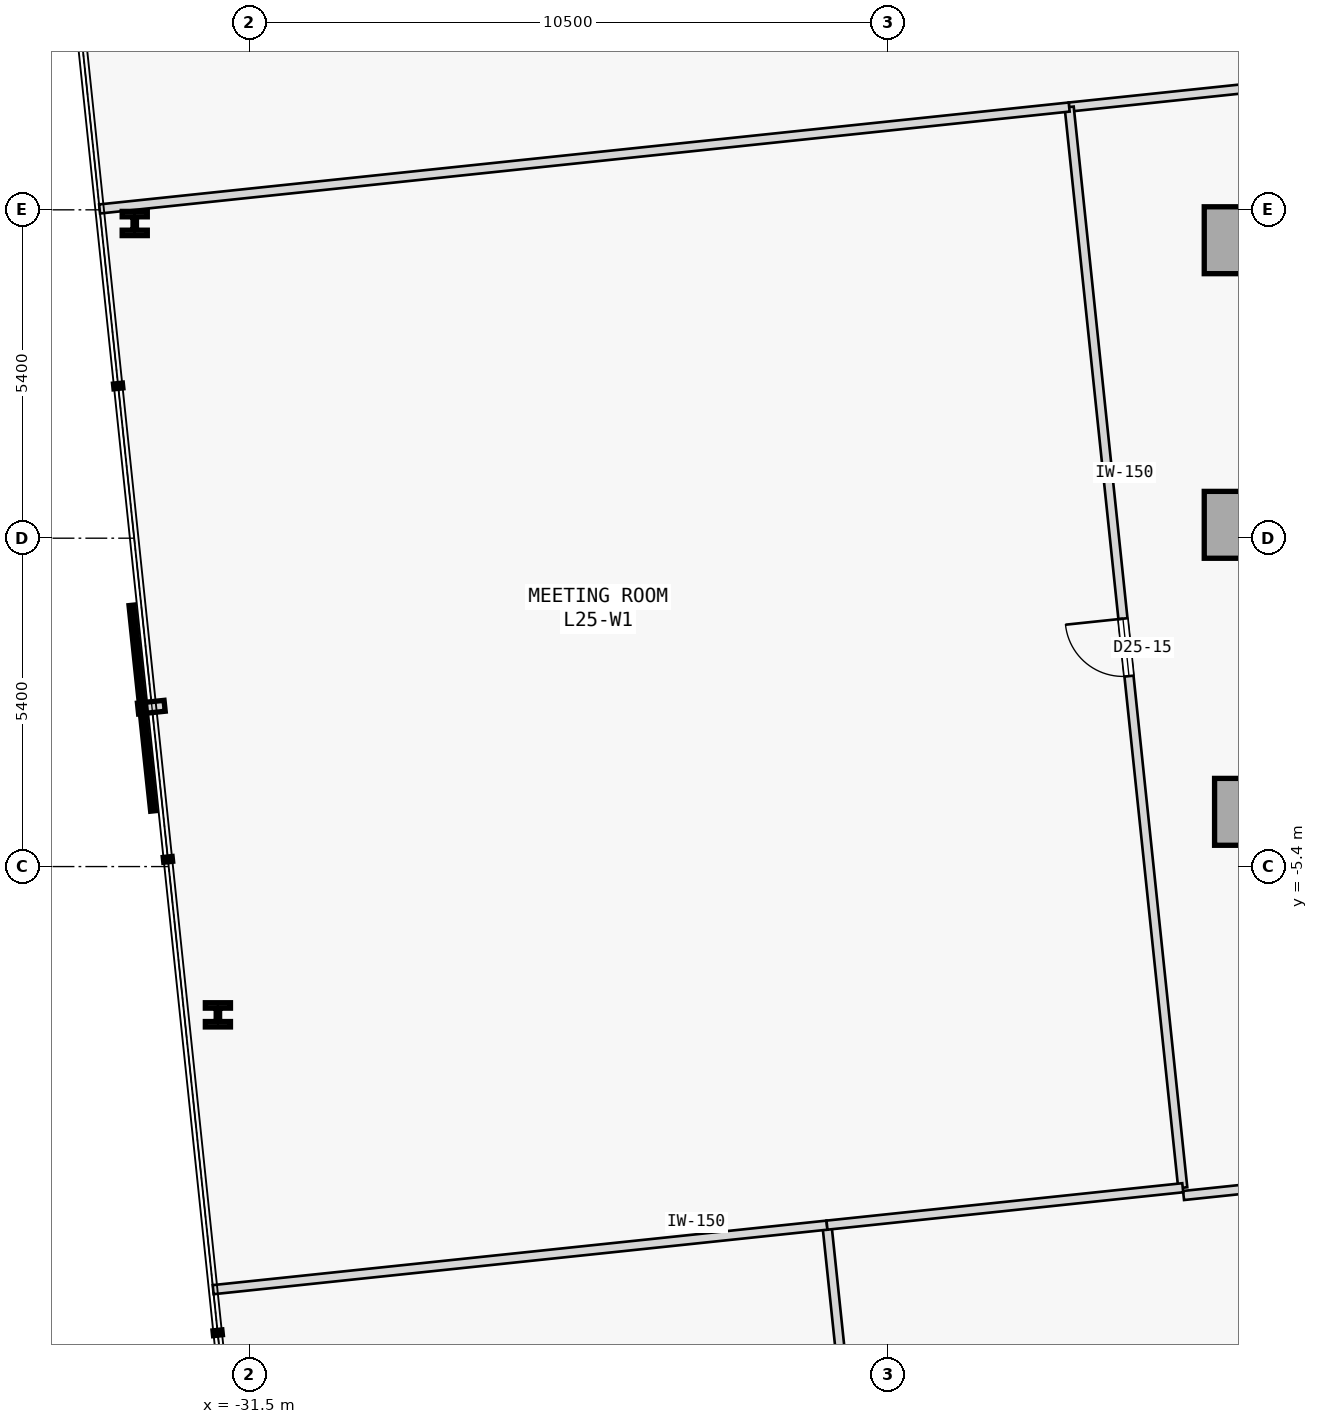
"""IFC4 building model, lengths in metres.
Left out: names, types, materials, properties, quantities, classifications, styles, units other than length and angle.
Written with IfcOpenShell. Run it as: python <this file> out.ifc"""

import sys

from ifc_helpers import new_model, si_unit, direction, frame, frame_2d, origin, origin_2d, place, context, subcontext, project, spatial, rectangle, i_section, extrude, element, fill, save


model = new_model("IFC4")
c1 = context("Model", 3, precision=1e-05, world=origin(), true_north=direction((0.0, 1.0)))
c2 = subcontext(c1, "Body", "Model", "MODEL_VIEW")
j1 = project(units=[si_unit("LENGTHUNIT", "METRE"), si_unit("PLANEANGLEUNIT", "RADIAN")], contexts=[c1])
p1 = place(None, origin())
s1 = spatial("IfcSite", under=j1, at=p1, CompositionType="ELEMENT")
p2 = place(p1, origin())
s2 = spatial("IfcBuilding", under=s1, at=p2, CompositionType="ELEMENT")
p3 = place(p2, frame((0.0, 0.0, 102.2)))
s3 = spatial("IfcBuildingStorey", under=s2, at=p3, CompositionType="ELEMENT", Elevation=102.2)
for number, where, z_axis, x_axis in (
    (1, (-15.25, 4.9, 0.0), (0.0, 0.0, 1.0), (1.0, 0.0, 0.0)),
    (2, (-15.25, 0.22, 0.0), (0.0, 0.0, 1.0), (1.0, 0.0, 0.0)),
    (3, (-15.08, -4.5, 0.0), (0.0, 0.0, 1.0), (1.0, 0.0, 0.0)),
):
    element("IfcColumn", number, at=place(p3, frame(where, z_axis=z_axis, x_axis=x_axis)), inside=s3, PredefinedType="COLUMN", context=c2, shape_type="SweptSolid", body=[
        extrude(rectangle(XDim=1.1, YDim=1.1, at=origin_2d()), origin(), (0.0, 0.0, 1.0), 3.7),
    ])
for number, where, z_axis, x_axis in (
    (4, (-33.388, 5.175, 0.0), (0.0, 0.0, 1.0), (1.0, 0.0, 0.0)),
    (5, (-32.021, -7.838, 0.0), (0.0, 0.0, 1.0), (1.0, 0.0, 0.0)),
):
    element("IfcColumn", number, at=place(p3, frame(where, z_axis=z_axis, x_axis=x_axis)), inside=s3, PredefinedType="COLUMN", context=c2, shape_type="SweptSolid", body=[
        extrude(i_section(OverallWidth=0.413, OverallDepth=0.398, WebThickness=0.056, FlangeThickness=0.089, FilletRadius=0.015, at=origin_2d()), origin(), (0.0, 0.0, 1.0), 3.7),
    ])
p4 = place(p3, frame((-18.021, 7.09, 0.0), z_axis=(0.0, 0.0, 1.0), x_axis=(0.994522981742, 0.104518126592, 0.0)))
e6 = element("IfcWall", 6, at=p4, inside=s3, PredefinedType="PARTITIONING", context=c2, shape_type="SweptSolid", body=[
    extrude(rectangle(XDim=8.617, YDim=0.15, at=frame_2d((4.309, 0.0))), origin(), (0.0, 0.0, 1.0), 3.475),
])
p5 = place(p4, frame((3.833, 0.0, 0.0)))
e7 = element("IfcOpeningElement", 7, at=p5, cuts=e6, PredefinedType="OPENING", context=c2, shape_type="SweptSolid", body=[
    extrude(rectangle(XDim=0.95, YDim=2.15, at=frame_2d((0.475, 1.075))), frame((0.0, 0.085, 0.0), z_axis=(0.0, -1.0, 0.0), x_axis=(1.0, 0.0, 0.0)), (0.0, 0.0, 1.0), 0.17),
])
p6 = place(p3, frame((-16.14, -10.809, 0.0), z_axis=(0.0, 0.0, 1.0), x_axis=(0.994520805081, 0.104538836136, 0.0)))
e8 = element("IfcWall", 8, at=p6, inside=s3, PredefinedType="PARTITIONING", context=c2, shape_type="SweptSolid", body=[
    extrude(rectangle(XDim=4.267, YDim=0.15, at=frame_2d((2.133, 0.0))), origin(), (0.0, 0.0, 1.0), 3.475),
])
p7 = place(p6, frame((1.658, 0.0, 0.0)))
e9 = element("IfcOpeningElement", 9, at=p7, cuts=e8, PredefinedType="OPENING", context=c2, shape_type="SweptSolid", body=[
    extrude(rectangle(XDim=0.95, YDim=2.15, at=frame_2d((0.475, 1.075))), frame((0.0, 0.085, 0.0), z_axis=(0.0, -1.0, 0.0), x_axis=(1.0, 0.0, 0.0)), (0.0, 0.0, 1.0), 0.17),
])
p8 = place(p3, frame((-16.153, -10.682, 0.0), z_axis=(0.0, 0.0, 1.0), x_axis=(-0.104527614588, 0.994521984568, 0.0)))
e10 = element("IfcWall", 10, at=p8, inside=s3, PredefinedType="PARTITIONING", context=c2, shape_type="SweptSolid", body=[
    extrude(rectangle(XDim=17.87, YDim=0.15, at=frame_2d((8.935, 0.0))), origin(), (0.0, 0.0, 1.0), 3.475),
])
p9 = place(p8, frame((8.46, 0.0, 0.0)))
e11 = element("IfcOpeningElement", 11, at=p9, cuts=e10, PredefinedType="OPENING", context=c2, shape_type="SweptSolid", body=[
    extrude(rectangle(XDim=0.95, YDim=2.15, at=frame_2d((0.475, 1.075))), frame((0.0, 0.085, 0.0), z_axis=(0.0, -1.0, 0.0), x_axis=(1.0, 0.0, 0.0)), (0.0, 0.0, 1.0), 0.17),
])
p10 = place(p3, frame((-33.967, 5.414, 0.0), z_axis=(0.0, 0.0, 1.0), x_axis=(0.994521211213, 0.104534972363, 0.0)))
e12 = element("IfcWall", 12, at=p10, inside=s3, PredefinedType="PARTITIONING", context=c2, shape_type="SweptSolid", body=[
    extrude(rectangle(XDim=16.033, YDim=0.15, at=frame_2d((8.017, 0.0))), origin(), (0.0, 0.0, 1.0), 3.475),
])
p11 = place(p3, frame((-20.727, -23.451, 0.0), z_axis=(0.0, 0.0, 1.0), x_axis=(-0.104522554453, 0.994522516392, 0.0)))
e13 = element("IfcWall", 13, at=p11, inside=s3, PredefinedType="PARTITIONING", context=c2, shape_type="SweptSolid", body=[
    extrude(rectangle(XDim=12.221, YDim=0.15, at=frame_2d((6.11, 0.0))), origin(), (0.0, 0.0, 1.0), 3.475),
])
p12 = place(p11, frame((5.635, 0.0, 0.0)))
e14 = element("IfcOpeningElement", 14, at=p12, cuts=e13, PredefinedType="OPENING", context=c2, shape_type="SweptSolid", body=[
    extrude(rectangle(XDim=0.95, YDim=2.15, at=frame_2d((0.475, 1.075))), frame((0.0, 0.085, 0.0), z_axis=(0.0, -1.0, 0.0), x_axis=(1.0, 0.0, 0.0)), (0.0, 0.0, 1.0), 0.17),
])
p13 = place(p3, frame((-32.099, -12.358, 0.0), z_axis=(0.0, 0.0, 1.0), x_axis=(0.994523757593, 0.104510743869, 0.0)))
e15 = element("IfcWall", 15, at=p13, inside=s3, PredefinedType="PARTITIONING", context=c2, shape_type="SweptSolid", body=[
    extrude(rectangle(XDim=10.15, YDim=0.15, at=frame_2d((5.075, 0.0))), origin(), (0.0, 0.0, 1.0), 3.475),
])
p14 = place(p3, frame((-22.004, -11.297, 0.0), z_axis=(0.0, 0.0, 1.0), x_axis=(0.994521131746, 0.10453572839, 0.0)))
e16 = element("IfcWall", 16, at=p14, inside=s3, PredefinedType="PARTITIONING", context=c2, shape_type="SweptSolid", body=[
    extrude(rectangle(XDim=5.883, YDim=0.15, at=frame_2d((2.941, 0.0))), origin(), (0.0, 0.0, 1.0), 3.475),
])
p15 = place(p9, origin())
e17 = element("IfcDoor", 17, at=p15, inside=s3, OperationType="SINGLE_SWING_RIGHT", PredefinedType="DOOR", context=c2, shape_type="SweptSolid", body=[
    extrude(rectangle(XDim=0.95, YDim=2.15, at=frame_2d((0.475, 1.075))), frame((0.0, 0.025, 0.0), z_axis=(0.0, -1.0, 0.0), x_axis=(1.0, 0.0, 0.0)), (0.0, 0.0, 1.0), 0.05),
])
fill(e11, e17)
save(model, sys.argv[1])
